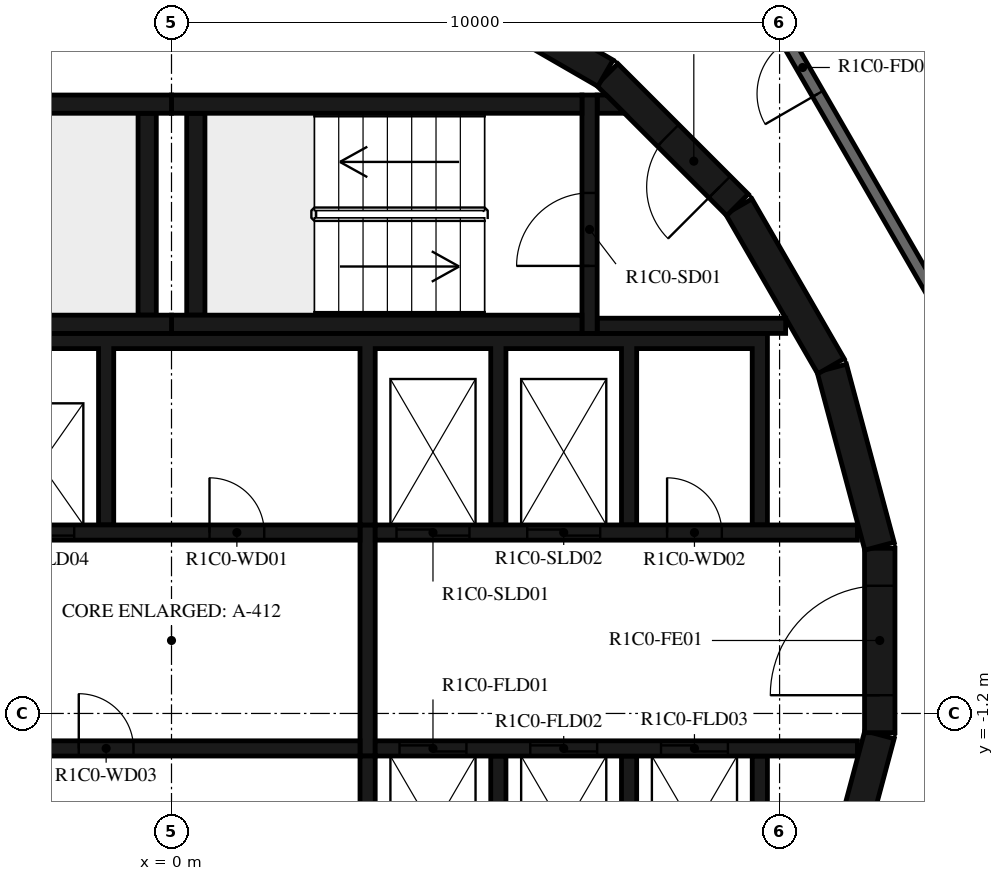
"""IFC4 building model, lengths in metres.
Left out: names, types, materials, properties, quantities, classifications, styles, units other than length and angle.
Written with IfcOpenShell. Run it as: python <this file> out.ifc"""

import sys

from ifc_helpers import new_model, si_unit, direction, frame, frame_2d, origin, place, context, subcontext, project, spatial, polyline, rectangle, outline, extrude, element, fill, save


model = new_model("IFC4")
c1 = context("Model", 3, precision=1e-05, world=origin(), true_north=direction((0.0, 1.0)))
c2 = subcontext(c1, "Body", "Model", "MODEL_VIEW")
j1 = project(units=[si_unit("LENGTHUNIT", "METRE"), si_unit("PLANEANGLEUNIT", "RADIAN")], contexts=[c1])
p1 = place(None, origin())
s1 = spatial("IfcSite", under=j1, at=p1, CompositionType="ELEMENT")
p2 = place(p1, origin())
s2 = spatial("IfcBuilding", under=s1, at=p2, CompositionType="ELEMENT")
p3 = place(p2, frame((0.0, 0.0, 66.4)))
s3 = spatial("IfcBuildingStorey", under=s2, at=p3, CompositionType="ELEMENT", Elevation=66.4)
p4 = place(p3, frame((10.858, -4.479, 0.0), z_axis=(0.0, 0.0, 1.0), x_axis=(0.258734743916, 0.965948410781, 0.0)))
e1 = element("IfcWall", 1, at=p4, inside=s3, PredefinedType="SHEAR", context=c2, shape_type="SweptSolid", body=[
    extrude(rectangle(XDim=3.033, YDim=0.5, at=frame_2d((1.516, 0.0))), origin(), (0.0, 0.0, 1.0), 3.05),
])
p5 = place(p3, frame((11.647, -1.516, 0.0), z_axis=(0.0, 0.0, 1.0), x_axis=(0.0, 1.0, 0.0)))
e2 = element("IfcWall", 2, at=p5, inside=s3, PredefinedType="SHEAR", context=c2, shape_type="SweptSolid", body=[
    extrude(rectangle(XDim=3.033, YDim=0.5, at=frame_2d((1.516, 0.0))), origin(), (0.0, 0.0, 1.0), 3.05),
])
p6 = place(p5, frame((0.616, 0.0, 0.0)))
e3 = element("IfcOpeningElement", 3, at=p6, cuts=e2, PredefinedType="OPENING", context=c2, shape_type="SweptSolid", body=[
    extrude(rectangle(XDim=1.8, YDim=2.1, at=frame_2d((0.9, 1.05))), frame((0.0, 0.26, 0.0), z_axis=(0.0, -1.0, 0.0), x_axis=(1.0, 0.0, 0.0)), (0.0, 0.0, 1.0), 0.52),
])
for number, where, z_axis, x_axis in (
    (4, (11.643, 1.55, 0.0), (0.0, 0.0, 1.0), (-0.259, 0.966, 0.0)),
    (5, (10.845, 4.51, 0.0), (0.0, 0.0, 1.0), (-0.5, 0.866, 0.0)),
):
    element("IfcWall", number, at=place(p3, frame(where, z_axis=z_axis, x_axis=x_axis)), inside=s3, PredefinedType="SHEAR", context=c2, shape_type="SweptSolid", body=[
        extrude(rectangle(XDim=3.033, YDim=0.5, at=frame_2d((1.516, 0.0))), origin(), (0.0, 0.0, 1.0), 3.05),
    ])
p7 = place(p3, frame((9.308, 7.164, 0.0), z_axis=(0.0, 0.0, 1.0), x_axis=(-0.707106781187, 0.707106781187, 0.0)))
e6 = element("IfcWall", 6, at=p7, inside=s3, PredefinedType="SHEAR", context=c2, shape_type="SweptSolid", body=[
    extrude(rectangle(XDim=3.032, YDim=0.5, at=frame_2d((1.516, 0.0))), origin(), (0.0, 0.0, 1.0), 3.05),
])
p8 = place(p7, frame((0.416, 0.0, 0.0)))
e7 = element("IfcOpeningElement", 7, at=p8, cuts=e6, PredefinedType="OPENING", context=c2, shape_type="SweptSolid", body=[
    extrude(rectangle(XDim=1.2, YDim=2.1, at=frame_2d((0.6, 1.05))), frame((0.0, 0.26, 0.0), z_axis=(0.0, -1.0, 0.0), x_axis=(1.0, 0.0, 0.0)), (0.0, 0.0, 1.0), 0.52),
])
p9 = place(p3, frame((7.137, 9.329, 0.0), z_axis=(0.0, 0.0, 1.0), x_axis=(-0.865975092491, 0.500087131594, 0.0)))
e8 = element("IfcWall", 8, at=p9, inside=s3, PredefinedType="SHEAR", context=c2, shape_type="SweptSolid", body=[
    extrude(rectangle(XDim=3.033, YDim=0.5, at=frame_2d((1.516, 0.0))), origin(), (0.0, 0.0, 1.0), 3.05),
])
for number, where, z_axis, x_axis in (
    (9, (0.0, 5.2, 0.0), (0.0, 0.0, 1.0), (1.0, 0.0, 0.0)),
    (10, (0.0, 8.82, 0.0), (0.0, 0.0, 1.0), (1.0, 0.0, 0.0)),
):
    element("IfcWall", number, at=place(p3, frame(where, z_axis=z_axis, x_axis=x_axis)), inside=s3, PredefinedType="SHEAR", context=c2, shape_type="SweptSolid", body=[
        extrude(rectangle(XDim=6.75, YDim=0.3, at=frame_2d((3.375, 0.0))), origin(), (0.0, 0.0, 1.0), 3.05),
    ])
p10 = place(p3, frame((0.4, 5.35, 0.0), z_axis=(0.0, 0.0, 1.0), x_axis=(0.0, 1.0, 0.0)))
e11 = element("IfcWall", 11, at=p10, inside=s3, PredefinedType="SHEAR", context=c2, shape_type="SweptSolid", body=[
    extrude(rectangle(XDim=3.32, YDim=0.3, at=frame_2d((1.66, 0.0))), origin(), (0.0, 0.0, 1.0), 3.05),
])
p11 = place(p3, frame((6.875, 5.05, 0.0), z_axis=(0.0, 0.0, 1.0), x_axis=(0.0, 1.0, 0.0)))
e12 = element("IfcWall", 12, at=p11, inside=s3, PredefinedType="SHEAR", context=c2, shape_type="SweptSolid", body=[
    extrude(rectangle(XDim=3.92, YDim=0.25, at=frame_2d((1.96, 0.0))), origin(), (0.0, 0.0, 1.0), 3.05),
])
p12 = place(p11, frame((1.11, 0.0, 0.0)))
e13 = element("IfcOpeningElement", 13, at=p12, cuts=e12, PredefinedType="OPENING", context=c2, shape_type="SweptSolid", body=[
    extrude(rectangle(XDim=1.2, YDim=2.1, at=frame_2d((0.6, 1.05))), frame((0.0, 0.135, 0.0), z_axis=(0.0, -1.0, 0.0), x_axis=(1.0, 0.0, 0.0)), (0.0, 0.0, 1.0), 0.27),
])
p13 = place(p3, frame((7.0, 5.175, 0.0), z_axis=(0.0, 0.0, 1.0), x_axis=(1.0, 0.0, 0.0)))
e14 = element("IfcWall", 14, at=p13, inside=s3, PredefinedType="SHEAR", context=c2, shape_type="SweptSolid", body=[
    extrude(rectangle(XDim=3.1, YDim=0.25, at=frame_2d((1.55, 0.0))), origin(), (0.0, 0.0, 1.0), 3.05),
])
p14 = place(p3, origin())
e15 = element("IfcWall", 15, at=p14, inside=s3, PredefinedType="SHEAR", context=c2, shape_type="SweptSolid", body=[
    extrude(outline(polyline([(7.448, 8.67), (7.0, 8.67), (7.0, 8.97), (7.148, 8.97), (7.448, 8.67)])), origin(), (0.0, 0.0, 1.0), 3.05),
])
for number, where, z_axis, x_axis in (
    (16, (-6.75, 5.2, 0.0), (0.0, 0.0, 1.0), (1.0, 0.0, 0.0)),
    (17, (-6.75, 8.82, 0.0), (0.0, 0.0, 1.0), (1.0, 0.0, 0.0)),
):
    element("IfcWall", number, at=place(p3, frame(where, z_axis=z_axis, x_axis=x_axis)), inside=s3, PredefinedType="SHEAR", context=c2, shape_type="SweptSolid", body=[
        extrude(rectangle(XDim=6.75, YDim=0.3, at=frame_2d((3.375, 0.0))), origin(), (0.0, 0.0, 1.0), 3.05),
    ])
p15 = place(p3, frame((-0.4, 5.35, 0.0), z_axis=(0.0, 0.0, 1.0), x_axis=(0.0, 1.0, 0.0)))
e18 = element("IfcWall", 18, at=p15, inside=s3, PredefinedType="SHEAR", context=c2, shape_type="SweptSolid", body=[
    extrude(rectangle(XDim=3.32, YDim=0.3, at=frame_2d((1.66, 0.0))), origin(), (0.0, 0.0, 1.0), 3.05),
])
p16 = place(p3, origin())
e19 = element("IfcWall", 19, at=p16, inside=s3, PredefinedType="SHEAR", context=c2, shape_type="SweptSolid", body=[
    extrude(outline(polyline([(-9.55, 4.8), (-7.65, 4.8), (-7.65, 1.9), (-7.4, 1.9), (-7.4, 4.8), (-5.5, 4.8), (-5.5, 1.9), (-5.25, 1.9), (-5.25, 4.8), (-3.35, 4.8), (-3.35, 1.9), (-3.1, 1.9), (-3.1, 4.8), (-1.2, 4.8), (-1.2, 1.9), (-0.95, 1.9), (-0.95, 4.8), (3.1, 4.8), (3.1, 1.9), (3.35, 1.9), (3.35, 4.8), (5.25, 4.8), (5.25, 1.9), (5.5, 1.9), (5.5, 4.8), (7.4, 4.8), (7.4, 1.9), (7.65, 1.9), (7.65, 4.8), (9.55, 4.8), (9.55, 1.9), (9.8, 1.9), (9.8, 4.8), (9.8, 5.05), (-9.8, 5.05), (-9.8, 4.8), (-9.8, 1.9), (-9.55, 1.9), (-9.55, 4.8)])), origin(), (0.0, 0.0, 1.0), 3.05),
])
p17 = place(p3, origin())
e20 = element("IfcWall", 20, at=p17, inside=s3, PredefinedType="SHEAR", context=c2, shape_type="SweptSolid", body=[
    extrude(outline(polyline([(9.8, -5.05), (9.8, -4.8), (9.8, -1.9), (9.55, -1.9), (9.55, -4.8), (7.65, -4.8), (7.65, -1.9), (7.4, -1.9), (7.4, -4.8), (5.5, -4.8), (5.5, -1.9), (5.25, -1.9), (5.25, -4.8), (3.35, -4.8), (3.35, -1.9), (3.1, -1.9), (3.1, -4.8), (-5.25, -4.8), (-5.25, -1.9), (-5.5, -1.9), (-5.5, -4.8), (-7.4, -4.8), (-7.4, -1.9), (-7.65, -1.9), (-7.65, -4.8), (-9.55, -4.8), (-9.55, -1.9), (-9.8, -1.9), (-9.8, -4.8), (-9.8, -5.05), (9.8, -5.05)])), origin(), (0.0, 0.0, 1.0), 3.05),
])
p18 = place(p3, frame((-11.28, 1.775, 0.0), z_axis=(0.0, 0.0, 1.0), x_axis=(1.0, 0.0, 0.0)))
e21 = element("IfcWall", 21, at=p18, inside=s3, PredefinedType="SHEAR", context=c2, shape_type="SweptSolid", body=[
    extrude(rectangle(XDim=14.38, YDim=0.25, at=frame_2d((7.19, 0.0))), origin(), (0.0, 0.0, 1.0), 3.05),
])
p19 = place(p18, frame((2.13, 0.0, 0.0)))
e22 = element("IfcOpeningElement", 22, at=p19, cuts=e21, PredefinedType="OPENING", context=c2, shape_type="SweptSolid", body=[
    extrude(rectangle(XDim=1.1, YDim=2.1, at=frame_2d((0.55, 1.05))), frame((0.0, 0.135, 0.0), z_axis=(0.0, -1.0, 0.0), x_axis=(1.0, 0.0, 0.0)), (0.0, 0.0, 1.0), 0.27),
])
p20 = place(p18, frame((4.28, 0.0, 0.0)))
e23 = element("IfcOpeningElement", 23, at=p20, cuts=e21, PredefinedType="OPENING", context=c2, shape_type="SweptSolid", body=[
    extrude(rectangle(XDim=1.1, YDim=2.1, at=frame_2d((0.55, 1.05))), frame((0.0, 0.135, 0.0), z_axis=(0.0, -1.0, 0.0), x_axis=(1.0, 0.0, 0.0)), (0.0, 0.0, 1.0), 0.27),
])
p21 = place(p18, frame((6.43, 0.0, 0.0)))
e24 = element("IfcOpeningElement", 24, at=p21, cuts=e21, PredefinedType="OPENING", context=c2, shape_type="SweptSolid", body=[
    extrude(rectangle(XDim=1.1, YDim=2.1, at=frame_2d((0.55, 1.05))), frame((0.0, 0.135, 0.0), z_axis=(0.0, -1.0, 0.0), x_axis=(1.0, 0.0, 0.0)), (0.0, 0.0, 1.0), 0.27),
])
p22 = place(p18, frame((8.58, 0.0, 0.0)))
e25 = element("IfcOpeningElement", 25, at=p22, cuts=e21, PredefinedType="OPENING", context=c2, shape_type="SweptSolid", body=[
    extrude(rectangle(XDim=1.1, YDim=2.1, at=frame_2d((0.55, 1.05))), frame((0.0, 0.135, 0.0), z_axis=(0.0, -1.0, 0.0), x_axis=(1.0, 0.0, 0.0)), (0.0, 0.0, 1.0), 0.27),
])
p23 = place(p18, frame((11.905, 0.0, 0.0)))
e26 = element("IfcOpeningElement", 26, at=p23, cuts=e21, PredefinedType="OPENING", context=c2, shape_type="SweptSolid", body=[
    extrude(rectangle(XDim=0.9, YDim=2.1, at=frame_2d((0.45, 1.05))), frame((0.0, 0.135, 0.0), z_axis=(0.0, -1.0, 0.0), x_axis=(1.0, 0.0, 0.0)), (0.0, 0.0, 1.0), 0.27),
])
p24 = place(p3, frame((3.35, 1.775, 0.0), z_axis=(0.0, 0.0, 1.0), x_axis=(1.0, 0.0, 0.0)))
e27 = element("IfcWall", 27, at=p24, inside=s3, PredefinedType="SHEAR", context=c2, shape_type="SweptSolid", body=[
    extrude(rectangle(XDim=7.93, YDim=0.25, at=frame_2d((3.965, 0.0))), origin(), (0.0, 0.0, 1.0), 3.05),
])
p25 = place(p24, frame((0.35, 0.0, 0.0)))
e28 = element("IfcOpeningElement", 28, at=p25, cuts=e27, PredefinedType="OPENING", context=c2, shape_type="SweptSolid", body=[
    extrude(rectangle(XDim=1.2, YDim=2.4, at=frame_2d((0.6, 1.2))), frame((0.0, 0.135, 0.0), z_axis=(0.0, -1.0, 0.0), x_axis=(1.0, 0.0, 0.0)), (0.0, 0.0, 1.0), 0.27),
])
p26 = place(p24, frame((2.5, 0.0, 0.0)))
e29 = element("IfcOpeningElement", 29, at=p26, cuts=e27, PredefinedType="OPENING", context=c2, shape_type="SweptSolid", body=[
    extrude(rectangle(XDim=1.2, YDim=2.4, at=frame_2d((0.6, 1.2))), frame((0.0, 0.135, 0.0), z_axis=(0.0, -1.0, 0.0), x_axis=(1.0, 0.0, 0.0)), (0.0, 0.0, 1.0), 0.27),
])
p27 = place(p24, frame((4.8, 0.0, 0.0)))
e30 = element("IfcOpeningElement", 30, at=p27, cuts=e27, PredefinedType="OPENING", context=c2, shape_type="SweptSolid", body=[
    extrude(rectangle(XDim=0.9, YDim=2.1, at=frame_2d((0.45, 1.05))), frame((0.0, 0.135, 0.0), z_axis=(0.0, -1.0, 0.0), x_axis=(1.0, 0.0, 0.0)), (0.0, 0.0, 1.0), 0.27),
])
p28 = place(p3, frame((-11.28, -1.775, 0.0), z_axis=(0.0, 0.0, 1.0), x_axis=(1.0, 0.0, 0.0)))
e31 = element("IfcWall", 31, at=p28, inside=s3, PredefinedType="SHEAR", context=c2, shape_type="SweptSolid", body=[
    extrude(rectangle(XDim=14.38, YDim=0.25, at=frame_2d((7.19, 0.0))), origin(), (0.0, 0.0, 1.0), 3.05),
])
p29 = place(p28, frame((9.755, 0.0, 0.0)))
e32 = element("IfcOpeningElement", 32, at=p29, cuts=e31, PredefinedType="OPENING", context=c2, shape_type="SweptSolid", body=[
    extrude(rectangle(XDim=0.9, YDim=2.1, at=frame_2d((0.45, 1.05))), frame((0.0, 0.135, 0.0), z_axis=(0.0, -1.0, 0.0), x_axis=(1.0, 0.0, 0.0)), (0.0, 0.0, 1.0), 0.27),
])
p30 = place(p3, frame((3.35, -1.775, 0.0), z_axis=(0.0, 0.0, 1.0), x_axis=(1.0, 0.0, 0.0)))
e33 = element("IfcWall", 33, at=p30, inside=s3, PredefinedType="SHEAR", context=c2, shape_type="SweptSolid", body=[
    extrude(rectangle(XDim=7.93, YDim=0.25, at=frame_2d((3.965, 0.0))), origin(), (0.0, 0.0, 1.0), 3.05),
])
p31 = place(p30, frame((0.4, 0.0, 0.0)))
e34 = element("IfcOpeningElement", 34, at=p31, cuts=e33, PredefinedType="OPENING", context=c2, shape_type="SweptSolid", body=[
    extrude(rectangle(XDim=1.1, YDim=2.4, at=frame_2d((0.55, 1.2))), frame((0.0, 0.135, 0.0), z_axis=(0.0, -1.0, 0.0), x_axis=(1.0, 0.0, 0.0)), (0.0, 0.0, 1.0), 0.27),
])
p32 = place(p30, frame((2.55, 0.0, 0.0)))
e35 = element("IfcOpeningElement", 35, at=p32, cuts=e33, PredefinedType="OPENING", context=c2, shape_type="SweptSolid", body=[
    extrude(rectangle(XDim=1.1, YDim=2.4, at=frame_2d((0.55, 1.2))), frame((0.0, 0.135, 0.0), z_axis=(0.0, -1.0, 0.0), x_axis=(1.0, 0.0, 0.0)), (0.0, 0.0, 1.0), 0.27),
])
p33 = place(p30, frame((4.7, 0.0, 0.0)))
e36 = element("IfcOpeningElement", 36, at=p33, cuts=e33, PredefinedType="OPENING", context=c2, shape_type="SweptSolid", body=[
    extrude(rectangle(XDim=1.1, YDim=2.4, at=frame_2d((0.55, 1.2))), frame((0.0, 0.135, 0.0), z_axis=(0.0, -1.0, 0.0), x_axis=(1.0, 0.0, 0.0)), (0.0, 0.0, 1.0), 0.27),
])
p34 = place(p3, frame((3.225, -1.9, 0.0), z_axis=(0.0, 0.0, 1.0), x_axis=(0.0, 1.0, 0.0)))
e37 = element("IfcWall", 37, at=p34, inside=s3, PredefinedType="SHEAR", context=c2, shape_type="SweptSolid", body=[
    extrude(rectangle(XDim=3.8, YDim=0.25, at=frame_2d((1.9, 0.0))), origin(), (0.0, 0.0, 1.0), 3.05),
])
p35 = place(p3, frame((13.7, 3.671, 0.0), z_axis=(0.0, 0.0, 1.0), x_axis=(-0.500001669485, 0.866024439905, 0.0)))
e38 = element("IfcWall", 38, at=p35, inside=s3, PredefinedType="STANDARD", context=c2, shape_type="SweptSolid", body=[
    extrude(rectangle(XDim=7.342, YDim=0.2, at=frame_2d((3.671, 0.0))), origin(), (0.0, 0.0, 1.0), 3.05),
])
p36 = place(p35, frame((6.142, 0.0, 0.0)))
e39 = element("IfcOpeningElement", 39, at=p36, cuts=e38, PredefinedType="OPENING", context=c2, shape_type="SweptSolid", body=[
    extrude(rectangle(XDim=1.0, YDim=2.1, at=frame_2d((0.5, 1.05))), frame((0.0, 0.11, 0.0), z_axis=(0.0, -1.0, 0.0), x_axis=(1.0, 0.0, 0.0)), (0.0, 0.0, 1.0), 0.22),
])
p37 = place(p12, origin())
e40 = element("IfcDoor", 40, at=p37, inside=s3, OperationType="SINGLE_SWING_LEFT", PredefinedType="DOOR", context=c2, shape_type="SweptSolid", body=[
    extrude(rectangle(XDim=1.2, YDim=2.1, at=frame_2d((0.6, 1.05))), frame((0.0, 0.025, 0.0), z_axis=(0.0, -1.0, 0.0), x_axis=(1.0, 0.0, 0.0)), (0.0, 0.0, 1.0), 0.05),
])
fill(e13, e40)
p38 = place(p8, origin())
e41 = element("IfcDoor", 41, at=p38, inside=s3, OperationType="SINGLE_SWING_RIGHT", PredefinedType="DOOR", context=c2, shape_type="SweptSolid", body=[
    extrude(rectangle(XDim=1.2, YDim=2.1, at=frame_2d((0.6, 1.05))), frame((0.0, 0.025, 0.0), z_axis=(0.0, -1.0, 0.0), x_axis=(1.0, 0.0, 0.0)), (0.0, 0.0, 1.0), 0.05),
])
fill(e7, e41)
p39 = place(p6, origin())
e42 = element("IfcDoor", 42, at=p39, inside=s3, OperationType="DOUBLE_DOOR_SINGLE_SWING", PredefinedType="DOOR", context=c2, shape_type="SweptSolid", body=[
    extrude(rectangle(XDim=1.8, YDim=2.1, at=frame_2d((0.9, 1.05))), frame((0.0, 0.025, 0.0), z_axis=(0.0, -1.0, 0.0), x_axis=(1.0, 0.0, 0.0)), (0.0, 0.0, 1.0), 0.05),
])
fill(e3, e42)
p40 = place(p22, origin())
e43 = element("IfcDoor", 43, at=p40, inside=s3, OperationType="DOUBLE_DOOR_SLIDING", PredefinedType="DOOR", context=c2, shape_type="SweptSolid", body=[
    extrude(rectangle(XDim=1.1, YDim=2.1, at=frame_2d((0.55, 1.05))), frame((0.0, 0.025, 0.0), z_axis=(0.0, -1.0, 0.0), x_axis=(1.0, 0.0, 0.0)), (0.0, 0.0, 1.0), 0.05),
])
fill(e25, e43)
p41 = place(p25, origin())
e44 = element("IfcDoor", 44, at=p41, inside=s3, OperationType="DOUBLE_DOOR_SLIDING", PredefinedType="DOOR", context=c2, shape_type="SweptSolid", body=[
    extrude(rectangle(XDim=1.2, YDim=2.4, at=frame_2d((0.6, 1.2))), frame((0.0, 0.025, 0.0), z_axis=(0.0, -1.0, 0.0), x_axis=(1.0, 0.0, 0.0)), (0.0, 0.0, 1.0), 0.05),
])
fill(e28, e44)
p42 = place(p26, origin())
e45 = element("IfcDoor", 45, at=p42, inside=s3, OperationType="DOUBLE_DOOR_SLIDING", PredefinedType="DOOR", context=c2, shape_type="SweptSolid", body=[
    extrude(rectangle(XDim=1.2, YDim=2.4, at=frame_2d((0.6, 1.2))), frame((0.0, 0.025, 0.0), z_axis=(0.0, -1.0, 0.0), x_axis=(1.0, 0.0, 0.0)), (0.0, 0.0, 1.0), 0.05),
])
fill(e29, e45)
p43 = place(p31, origin())
e46 = element("IfcDoor", 46, at=p43, inside=s3, OperationType="DOUBLE_DOOR_SLIDING", PredefinedType="DOOR", context=c2, shape_type="SweptSolid", body=[
    extrude(rectangle(XDim=1.1, YDim=2.4, at=frame_2d((0.55, 1.2))), frame((0.0, 0.025, 0.0), z_axis=(0.0, -1.0, 0.0), x_axis=(1.0, 0.0, 0.0)), (0.0, 0.0, 1.0), 0.05),
])
fill(e34, e46)
p44 = place(p32, origin())
e47 = element("IfcDoor", 47, at=p44, inside=s3, OperationType="DOUBLE_DOOR_SLIDING", PredefinedType="DOOR", context=c2, shape_type="SweptSolid", body=[
    extrude(rectangle(XDim=1.1, YDim=2.4, at=frame_2d((0.55, 1.2))), frame((0.0, 0.025, 0.0), z_axis=(0.0, -1.0, 0.0), x_axis=(1.0, 0.0, 0.0)), (0.0, 0.0, 1.0), 0.05),
])
fill(e35, e47)
p45 = place(p33, origin())
e48 = element("IfcDoor", 48, at=p45, inside=s3, OperationType="DOUBLE_DOOR_SLIDING", PredefinedType="DOOR", context=c2, shape_type="SweptSolid", body=[
    extrude(rectangle(XDim=1.1, YDim=2.4, at=frame_2d((0.55, 1.2))), frame((0.0, 0.025, 0.0), z_axis=(0.0, -1.0, 0.0), x_axis=(1.0, 0.0, 0.0)), (0.0, 0.0, 1.0), 0.05),
])
fill(e36, e48)
p46 = place(p23, origin())
e49 = element("IfcDoor", 49, at=p46, inside=s3, OperationType="SINGLE_SWING_RIGHT", PredefinedType="DOOR", context=c2, shape_type="SweptSolid", body=[
    extrude(rectangle(XDim=0.9, YDim=2.1, at=frame_2d((0.45, 1.05))), frame((0.0, 0.025, 0.0), z_axis=(0.0, -1.0, 0.0), x_axis=(1.0, 0.0, 0.0)), (0.0, 0.0, 1.0), 0.05),
])
fill(e26, e49)
p47 = place(p27, origin())
e50 = element("IfcDoor", 50, at=p47, inside=s3, OperationType="SINGLE_SWING_LEFT", PredefinedType="DOOR", context=c2, shape_type="SweptSolid", body=[
    extrude(rectangle(XDim=0.9, YDim=2.1, at=frame_2d((0.45, 1.05))), frame((0.0, 0.025, 0.0), z_axis=(0.0, -1.0, 0.0), x_axis=(1.0, 0.0, 0.0)), (0.0, 0.0, 1.0), 0.05),
])
fill(e30, e50)
p48 = place(p29, origin())
e51 = element("IfcDoor", 51, at=p48, inside=s3, OperationType="SINGLE_SWING_RIGHT", PredefinedType="DOOR", context=c2, shape_type="SweptSolid", body=[
    extrude(rectangle(XDim=0.9, YDim=2.1, at=frame_2d((0.45, 1.05))), frame((0.0, 0.025, 0.0), z_axis=(0.0, -1.0, 0.0), x_axis=(1.0, 0.0, 0.0)), (0.0, 0.0, 1.0), 0.05),
])
fill(e32, e51)
p49 = place(p36, origin())
e52 = element("IfcDoor", 52, at=p49, inside=s3, OperationType="SINGLE_SWING_RIGHT", PredefinedType="DOOR", context=c2, shape_type="SweptSolid", body=[
    extrude(rectangle(XDim=1.0, YDim=2.1, at=frame_2d((0.5, 1.05))), frame((0.0, 0.025, 0.0), z_axis=(0.0, -1.0, 0.0), x_axis=(1.0, 0.0, 0.0)), (0.0, 0.0, 1.0), 0.05),
])
fill(e39, e52)
save(model, sys.argv[1])
